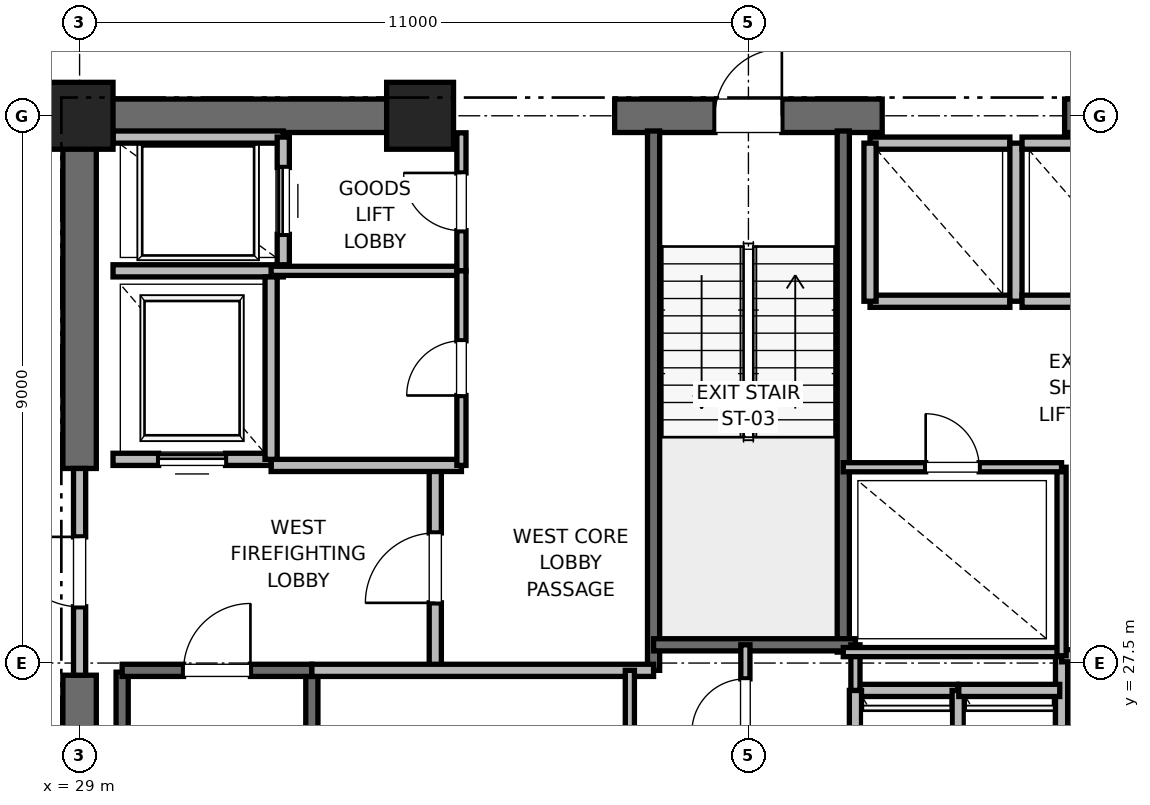
"""IFC4 building model, lengths in metres.
Left out: names, types, materials, properties, quantities, classifications, styles, units other than length and angle.
Written with IfcOpenShell. Run it as: python <this file> out.ifc"""

import sys

from ifc_helpers import new_model, si_unit, direction, frame, frame_2d, origin, origin_2d, place, context, subcontext, project, spatial, rectangle, extrude, element, fill, save


model = new_model("IFC4")
c1 = context("Model", 3, precision=1e-05, world=origin(), true_north=direction((0.0, 1.0)))
c2 = subcontext(c1, "Body", "Model", "MODEL_VIEW")
j1 = project(units=[si_unit("LENGTHUNIT", "METRE"), si_unit("PLANEANGLEUNIT", "RADIAN")], contexts=[c1])
p1 = place(None, origin())
s1 = spatial("IfcSite", under=j1, at=p1, CompositionType="ELEMENT")
p2 = place(p1, origin())
s2 = spatial("IfcBuilding", under=s1, at=p2, CompositionType="ELEMENT")
p3 = place(p2, frame((0.0, 0.0, 128.4)))
s3 = spatial("IfcBuildingStorey", under=s2, at=p3, CompositionType="ELEMENT", Elevation=128.4)
for number, where, z_axis, x_axis in (
    (1, (29.0, 36.5, 0.0), (0.0, 0.0, 1.0), (1.0, 0.0, 0.0)),
    (2, (34.6, 36.5, 0.0), (0.0, 0.0, 1.0), (1.0, 0.0, 0.0)),
):
    element("IfcColumn", number, at=place(p3, frame(where, z_axis=z_axis, x_axis=x_axis)), inside=s3, PredefinedType="PILASTER", context=c2, shape_type="SweptSolid", body=[
        extrude(rectangle(XDim=1.1, YDim=1.1, at=origin_2d()), origin(), (0.0, 0.0, 1.0), 4.0),
    ])
p4 = place(p3, frame((29.0, 36.5, 0.0), z_axis=(0.0, 0.0, 1.0), x_axis=(1.0, 0.0, 0.0)))
e3 = element("IfcWall", 3, at=p4, inside=s3, PredefinedType="SHEAR", context=c2, shape_type="SweptSolid", body=[
    extrude(rectangle(XDim=5.8, YDim=0.55, at=frame_2d((2.9, 0.0))), origin(), (0.0, 0.0, 1.0), 3.775),
])
p5 = place(p3, frame((37.8, 36.5, 0.0), z_axis=(0.0, 0.0, 1.0), x_axis=(1.0, 0.0, 0.0)))
e4 = element("IfcWall", 4, at=p5, inside=s3, PredefinedType="SHEAR", context=c2, shape_type="SweptSolid", body=[
    extrude(rectangle(XDim=4.4, YDim=0.55, at=frame_2d((2.2, 0.0))), origin(), (0.0, 0.0, 1.0), 3.775),
])
p6 = place(p5, frame((1.65, 0.0, 0.0)))
e5 = element("IfcOpeningElement", 5, at=p6, cuts=e4, PredefinedType="OPENING", context=c2, shape_type="SweptSolid", body=[
    extrude(rectangle(XDim=1.1, YDim=2.15, at=frame_2d((0.55, 1.075))), frame((0.0, 0.275, 0.0), z_axis=(0.0, -1.0, 0.0), x_axis=(1.0, 0.0, 0.0)), (0.0, 0.0, 1.0), 0.55),
])
p7 = place(p3, frame((45.2, 36.5, 0.0), z_axis=(0.0, 0.0, 1.0), x_axis=(1.0, 0.0, 0.0)))
e6 = element("IfcWall", 6, at=p7, inside=s3, PredefinedType="SHEAR", context=c2, shape_type="SweptSolid", body=[
    extrude(rectangle(XDim=5.8, YDim=0.55, at=frame_2d((2.9, 0.0))), origin(), (0.0, 0.0, 1.0), 3.775),
])
p8 = place(p3, frame((29.0, 18.5, 0.0), z_axis=(0.0, 0.0, 1.0), x_axis=(0.0, 1.0, 0.0)))
e7 = element("IfcWall", 7, at=p8, inside=s3, PredefinedType="SHEAR", context=c2, shape_type="SweptSolid", body=[
    extrude(rectangle(XDim=8.8, YDim=0.55, at=frame_2d((4.4, 0.0))), origin(), (0.0, 0.0, 1.0), 3.775),
])
p9 = place(p3, frame((29.0, 30.7, 0.0), z_axis=(0.0, 0.0, 1.0), x_axis=(0.0, 1.0, 0.0)))
e8 = element("IfcWall", 8, at=p9, inside=s3, PredefinedType="SHEAR", context=c2, shape_type="SweptSolid", body=[
    extrude(rectangle(XDim=5.8, YDim=0.55, at=frame_2d((2.9, 0.0))), origin(), (0.0, 0.0, 1.0), 3.775),
])
p10 = place(p3, frame((29.7, 19.2, 0.0), z_axis=(0.0, 0.0, 1.0), x_axis=(0.0, 1.0, 0.0)))
e9 = element("IfcWall", 9, at=p10, inside=s3, PredefinedType="SOLIDWALL", context=c2, shape_type="SweptSolid", body=[
    extrude(rectangle(XDim=8.15, YDim=0.2, at=frame_2d((4.075, 0.0))), origin(), (0.0, 0.0, 1.0), 3.775),
])
p11 = place(p3, frame((32.82, 18.6, 0.0), z_axis=(0.0, 0.0, 1.0), x_axis=(0.0, 1.0, 0.0)))
e10 = element("IfcWall", 10, at=p11, inside=s3, PredefinedType="SOLIDWALL", context=c2, shape_type="SweptSolid", body=[
    extrude(rectangle(XDim=8.78, YDim=0.2, at=frame_2d((4.39, 0.0))), origin(), (0.0, 0.0, 1.0), 3.775),
])
p12 = place(p3, frame((29.7, 27.38, 0.0), z_axis=(0.0, 0.0, 1.0), x_axis=(1.0, 0.0, 0.0)))
e11 = element("IfcWall", 11, at=p12, inside=s3, PredefinedType="SOLIDWALL", context=c2, shape_type="SweptSolid", body=[
    extrude(rectangle(XDim=3.12, YDim=0.2, at=frame_2d((1.56, 0.0))), origin(), (0.0, 0.0, 1.0), 3.775),
])
p13 = place(p12, frame((1.01, 0.0, 0.0)))
e12 = element("IfcOpeningElement", 12, at=p13, cuts=e11, PredefinedType="OPENING", context=c2, shape_type="SweptSolid", body=[
    extrude(rectangle(XDim=1.1, YDim=2.15, at=frame_2d((0.55, 1.075))), frame((0.0, 0.1, 0.0), z_axis=(0.0, -1.0, 0.0), x_axis=(1.0, 0.0, 0.0)), (0.0, 0.0, 1.0), 0.2),
])
p14 = place(p3, frame((38.44, 27.38, 0.0), z_axis=(0.0, 0.0, 1.0), x_axis=(0.0, 1.0, 0.0)))
e13 = element("IfcWall", 13, at=p14, inside=s3, PredefinedType="SOLIDWALL", context=c2, shape_type="SweptSolid", body=[
    extrude(rectangle(XDim=8.87, YDim=0.2, at=frame_2d((4.435, 0.0))), origin(), (0.0, 0.0, 1.0), 3.775),
])
p15 = place(p3, frame((41.56, 27.68, 0.0), z_axis=(0.0, 0.0, 1.0), x_axis=(0.0, 1.0, 0.0)))
e14 = element("IfcWall", 14, at=p15, inside=s3, PredefinedType="SOLIDWALL", context=c2, shape_type="SweptSolid", body=[
    extrude(rectangle(XDim=8.57, YDim=0.2, at=frame_2d((4.285, 0.0))), origin(), (0.0, 0.0, 1.0), 3.775),
])
p16 = place(p3, frame((38.44, 27.8, 0.0), z_axis=(0.0, 0.0, 1.0), x_axis=(1.0, 0.0, 0.0)))
e15 = element("IfcWall", 15, at=p16, inside=s3, PredefinedType="SOLIDWALL", context=c2, shape_type="SweptSolid", body=[
    extrude(rectangle(XDim=3.32, YDim=0.2, at=frame_2d((1.66, 0.0))), origin(), (0.0, 0.0, 1.0), 3.775),
])
p17 = place(p3, frame((34.85, 27.38, 0.0), z_axis=(0.0, 0.0, 1.0), x_axis=(0.0, 1.0, 0.0)))
e16 = element("IfcWall", 16, at=p17, inside=s3, PredefinedType="PARTITIONING", context=c2, shape_type="SweptSolid", body=[
    extrude(rectangle(XDim=3.37, YDim=0.2, at=frame_2d((1.685, 0.0))), origin(), (0.0, 0.0, 1.0), 3.775),
])
p18 = place(p17, frame((1.11, 0.0, 0.0)))
e17 = element("IfcOpeningElement", 17, at=p18, cuts=e16, PredefinedType="OPENING", context=c2, shape_type="SweptSolid", body=[
    extrude(rectangle(XDim=1.15, YDim=2.2, at=frame_2d((0.575, 1.1))), frame((0.0, 0.1, 0.0), z_axis=(0.0, -1.0, 0.0), x_axis=(1.0, 0.0, 0.0)), (0.0, 0.0, 1.0), 0.2),
])
p19 = place(p3, frame((29.0, 27.3, 0.0), z_axis=(0.0, 0.0, 1.0), x_axis=(0.0, 1.0, 0.0)))
e18 = element("IfcWall", 18, at=p19, inside=s3, PredefinedType="PARTITIONING", context=c2, shape_type="SweptSolid", body=[
    extrude(rectangle(XDim=3.4, YDim=0.2, at=frame_2d((1.7, 0.0))), origin(), (0.0, 0.0, 1.0), 2.755),
])
p20 = place(p19, frame((1.125, 0.0, 0.0)))
e19 = element("IfcOpeningElement", 19, at=p20, cuts=e18, PredefinedType="OPENING", context=c2, shape_type="SweptSolid", body=[
    extrude(rectangle(XDim=1.15, YDim=2.2, at=frame_2d((0.575, 1.1))), frame((0.0, 0.1, 0.0), z_axis=(0.0, -1.0, 0.0), x_axis=(1.0, 0.0, 0.0)), (0.0, 0.0, 1.0), 0.2),
])
p21 = place(p3, frame((32.82, 27.38, 0.0), z_axis=(0.0, 0.0, 1.0), x_axis=(1.0, 0.0, 0.0)))
e20 = element("IfcWall", 20, at=p21, inside=s3, PredefinedType="PARTITIONING", context=c2, shape_type="SweptSolid", body=[
    extrude(rectangle(XDim=5.62, YDim=0.2, at=frame_2d((2.81, 0.0))), origin(), (0.0, 0.0, 1.0), 3.775),
])
p22 = place(p3, frame((32.15, 30.75, 0.0), z_axis=(0.0, 0.0, 1.0), x_axis=(1.0, 0.0, 0.0)))
e21 = element("IfcWall", 21, at=p22, inside=s3, PredefinedType="PARTITIONING", context=c2, shape_type="SweptSolid", body=[
    extrude(rectangle(XDim=3.13, YDim=0.2, at=frame_2d((1.565, 0.0))), origin(), (0.0, 0.0, 1.0), 3.775),
])
p23 = place(p3, frame((45.15, 24.25, 0.0), z_axis=(0.0, 0.0, 1.0), x_axis=(0.0, 1.0, 0.0)))
e22 = element("IfcWall", 22, at=p23, inside=s3, PredefinedType="PARTITIONING", context=c2, shape_type="SweptSolid", body=[
    extrude(rectangle(XDim=3.37, YDim=0.2, at=frame_2d((1.685, 0.0))), origin(), (0.0, 0.0, 1.0), 3.775),
])
p24 = place(p3, frame((45.15, 27.62, 0.0), z_axis=(0.0, 0.0, 1.0), x_axis=(1.0, 0.0, 0.0)))
e23 = element("IfcWall", 23, at=p24, inside=s3, PredefinedType="PARTITIONING", context=c2, shape_type="SweptSolid", body=[
    extrude(rectangle(XDim=2.03, YDim=0.2, at=frame_2d((1.015, 0.0))), origin(), (0.0, 0.0, 1.0), 3.775),
])
p25 = place(p24, frame((0.44, 0.0, 0.0)))
e24 = element("IfcOpeningElement", 24, at=p25, cuts=e23, PredefinedType="OPENING", context=c2, shape_type="SweptSolid", body=[
    extrude(rectangle(XDim=1.15, YDim=2.2, at=frame_2d((0.575, 1.1))), frame((0.0, 0.1, 0.0), z_axis=(0.0, -1.0, 0.0), x_axis=(1.0, 0.0, 0.0)), (0.0, 0.0, 1.0), 0.2),
])
p26 = place(p3, frame((29.55, 30.85, 0.0), z_axis=(0.0, 0.0, 1.0), x_axis=(1.0, 0.0, 0.0)))
e25 = element("IfcWall", 25, at=p26, inside=s3, PredefinedType="SOLIDWALL", context=c2, shape_type="SweptSolid", body=[
    extrude(rectangle(XDim=2.6, YDim=0.2, at=frame_2d((1.3, 0.0))), origin(), (0.0, 0.0, 1.0), 2.755),
])
p27 = place(p26, frame((0.75, 0.0, 0.0)))
e26 = element("IfcOpeningElement", 26, at=p27, cuts=e25, PredefinedType="OPENING", context=c2, shape_type="SweptSolid", body=[
    extrude(rectangle(XDim=1.1, YDim=2.2, at=frame_2d((0.55, 1.1))), frame((0.0, 0.1, 0.0), z_axis=(0.0, -1.0, 0.0), x_axis=(1.0, 0.0, 0.0)), (0.0, 0.0, 1.0), 0.2),
])
p28 = place(p3, frame((29.55, 33.95, 0.0), z_axis=(0.0, 0.0, 1.0), x_axis=(1.0, 0.0, 0.0)))
e27 = element("IfcWall", 27, at=p28, inside=s3, PredefinedType="SOLIDWALL", context=c2, shape_type="SweptSolid", body=[
    extrude(rectangle(XDim=2.8, YDim=0.2, at=frame_2d((1.4, 0.0))), origin(), (0.0, 0.0, 1.0), 3.775),
])
p29 = place(p3, frame((32.15, 30.85, 0.0), z_axis=(0.0, 0.0, 1.0), x_axis=(0.0, 1.0, 0.0)))
e28 = element("IfcWall", 28, at=p29, inside=s3, PredefinedType="SOLIDWALL", context=c2, shape_type="SweptSolid", body=[
    extrude(rectangle(XDim=3.0, YDim=0.2, at=frame_2d((1.5, 0.0))), origin(), (0.0, 0.0, 1.0), 3.775),
])
p30 = place(p3, frame((32.35, 36.15, 0.0), z_axis=(0.0, 0.0, 1.0), x_axis=(-1.0, 0.0, 0.0)))
e29 = element("IfcWall", 29, at=p30, inside=s3, PredefinedType="SOLIDWALL", context=c2, shape_type="SweptSolid", body=[
    extrude(rectangle(XDim=2.8, YDim=0.2, at=frame_2d((1.4, 0.0))), origin(), (0.0, 0.0, 1.0), 2.985),
])
p31 = place(p3, frame((32.35, 34.05, 0.0), z_axis=(0.0, 0.0, 1.0), x_axis=(0.0, 1.0, 0.0)))
e30 = element("IfcWall", 30, at=p31, inside=s3, PredefinedType="SOLIDWALL", context=c2, shape_type="SweptSolid", body=[
    extrude(rectangle(XDim=2.1, YDim=0.2, at=frame_2d((1.05, 0.0))), origin(), (0.0, 0.0, 1.0), 3.775),
])
p32 = place(p31, frame((0.5, 0.0, 0.0)))
e31 = element("IfcOpeningElement", 31, at=p32, cuts=e30, PredefinedType="OPENING", context=c2, shape_type="SweptSolid", body=[
    extrude(rectangle(XDim=1.1, YDim=2.2, at=frame_2d((0.55, 1.1))), frame((0.0, 0.1, 0.0), z_axis=(0.0, -1.0, 0.0), x_axis=(1.0, 0.0, 0.0)), (0.0, 0.0, 1.0), 0.2),
])
p33 = place(p3, frame((43.44, 27.05, 0.0), z_axis=(0.0, 0.0, 1.0), x_axis=(-1.0, 0.0, 0.0)))
e32 = element("IfcWall", 32, at=p33, inside=s3, PredefinedType="SOLIDWALL", context=c2, shape_type="SweptSolid", body=[
    extrude(rectangle(XDim=1.68, YDim=0.2, at=frame_2d((0.84, 0.0))), origin(), (0.0, 0.0, 1.0), 3.775),
])
for number, where, z_axis, x_axis in (
    (33, (41.76, 27.05, 0.0), (0.0, 0.0, 1.0), (0.0, -1.0, 0.0)),
    (34, (43.45, 24.45, 0.0), (0.0, 0.0, 1.0), (0.0, 1.0, 0.0)),
):
    element("IfcWall", number, at=place(p3, frame(where, z_axis=z_axis, x_axis=x_axis)), inside=s3, PredefinedType="SOLIDWALL", context=c2, shape_type="SweptSolid", body=[
        extrude(rectangle(XDim=2.6, YDim=0.2, at=frame_2d((1.3, 0.0))), origin(), (0.0, 0.0, 1.0), 3.775),
    ])
p34 = place(p3, frame((45.12, 27.05, 0.0), z_axis=(0.0, 0.0, 1.0), x_axis=(-1.0, 0.0, 0.0)))
e35 = element("IfcWall", 35, at=p34, inside=s3, PredefinedType="SOLIDWALL", context=c2, shape_type="SweptSolid", body=[
    extrude(rectangle(XDim=1.66, YDim=0.2, at=frame_2d((0.83, 0.0))), origin(), (0.0, 0.0, 1.0), 3.775),
])
p35 = place(p3, frame((42.0, 33.45, 0.0), z_axis=(0.0, 0.0, 1.0), x_axis=(1.0, 0.0, 0.0)))
e36 = element("IfcWall", 36, at=p35, inside=s3, PredefinedType="SOLIDWALL", context=c2, shape_type="SweptSolid", body=[
    extrude(rectangle(XDim=2.3, YDim=0.2, at=frame_2d((1.15, 0.0))), origin(), (0.0, 0.0, 1.0), 3.775),
])
p36 = place(p3, frame((44.3, 36.05, 0.0), z_axis=(0.0, 0.0, 1.0), x_axis=(-1.0, 0.0, 0.0)))
e37 = element("IfcWall", 37, at=p36, inside=s3, PredefinedType="SOLIDWALL", context=c2, shape_type="SweptSolid", body=[
    extrude(rectangle(XDim=2.3, YDim=0.2, at=frame_2d((1.15, 0.0))), origin(), (0.0, 0.0, 1.0), 2.755),
])
for number, where, z_axis, x_axis in (
    (38, (42.0, 36.05, 0.0), (0.0, 0.0, 1.0), (0.0, -1.0, 0.0)),
    (39, (44.4, 33.45, 0.0), (0.0, 0.0, 1.0), (0.0, 1.0, 0.0)),
):
    element("IfcWall", number, at=place(p3, frame(where, z_axis=z_axis, x_axis=x_axis)), inside=s3, PredefinedType="SOLIDWALL", context=c2, shape_type="SweptSolid", body=[
        extrude(rectangle(XDim=2.6, YDim=0.2, at=frame_2d((1.3, 0.0))), origin(), (0.0, 0.0, 1.0), 2.755),
    ])
p37 = place(p3, frame((44.5, 33.45, 0.0), z_axis=(0.0, 0.0, 1.0), x_axis=(1.0, 0.0, 0.0)))
e40 = element("IfcWall", 40, at=p37, inside=s3, PredefinedType="SOLIDWALL", context=c2, shape_type="SweptSolid", body=[
    extrude(rectangle(XDim=2.3, YDim=0.2, at=frame_2d((1.15, 0.0))), origin(), (0.0, 0.0, 1.0), 3.775),
])
p38 = place(p3, frame((46.8, 36.05, 0.0), z_axis=(0.0, 0.0, 1.0), x_axis=(-1.0, 0.0, 0.0)))
e41 = element("IfcWall", 41, at=p38, inside=s3, PredefinedType="SOLIDWALL", context=c2, shape_type="SweptSolid", body=[
    extrude(rectangle(XDim=2.3, YDim=0.2, at=frame_2d((1.15, 0.0))), origin(), (0.0, 0.0, 1.0), 2.755),
])
p39 = place(p3, frame((41.76, 27.05, 0.0), z_axis=(0.0, 0.0, 1.0), x_axis=(0.0, 1.0, 0.0)))
e42 = element("IfcWall", 42, at=p39, inside=s3, PredefinedType="PARTITIONING", context=c2, shape_type="SweptSolid", body=[
    extrude(rectangle(XDim=0.75, YDim=0.15, at=frame_2d((0.375, 0.0))), origin(), (0.0, 0.0, 1.0), 2.85),
])
p40 = place(p3, frame((39.95, 25.8, 0.0), z_axis=(0.0, 0.0, 1.0), x_axis=(0.0, 1.0, 0.0)))
e43 = element("IfcWall", 43, at=p40, inside=s3, PredefinedType="PARTITIONING", context=c2, shape_type="SweptSolid", body=[
    extrude(rectangle(XDim=2.0, YDim=0.15, at=frame_2d((1.0, 0.0))), origin(), (0.0, 0.0, 1.0), 2.85),
])
p41 = place(p40, frame((0.56, 0.0, 0.0)))
e44 = element("IfcOpeningElement", 44, at=p41, cuts=e43, PredefinedType="OPENING", context=c2, shape_type="SweptSolid", body=[
    extrude(rectangle(XDim=0.88, YDim=2.1, at=frame_2d((0.44, 1.05))), frame((0.0, 0.075, 0.0), z_axis=(0.0, -1.0, 0.0), x_axis=(1.0, 0.0, 0.0)), (0.0, 0.0, 1.0), 0.15),
])
p42 = place(p3, frame((32.15, 33.95, 0.0), z_axis=(0.0, 0.0, 1.0), x_axis=(1.0, 0.0, 0.0)))
e45 = element("IfcWall", 45, at=p42, inside=s3, PredefinedType="PARTITIONING", context=c2, shape_type="SweptSolid", body=[
    extrude(rectangle(XDim=3.13, YDim=0.15, at=frame_2d((1.565, 0.0))), origin(), (0.0, 0.0, 1.0), 2.85),
])
p43 = place(p3, frame((35.28, 33.95, 0.0), z_axis=(0.0, 0.0, 1.0), x_axis=(0.0, 1.0, 0.0)))
e46 = element("IfcWall", 46, at=p43, inside=s3, PredefinedType="PARTITIONING", context=c2, shape_type="SweptSolid", body=[
    extrude(rectangle(XDim=2.27, YDim=0.15, at=frame_2d((1.135, 0.0))), origin(), (0.0, 0.0, 1.0), 2.755),
])
p44 = place(p43, frame((0.66, 0.0, 0.0)))
e47 = element("IfcOpeningElement", 47, at=p44, cuts=e46, PredefinedType="OPENING", context=c2, shape_type="SweptSolid", body=[
    extrude(rectangle(XDim=0.95, YDim=2.15, at=frame_2d((0.475, 1.075))), frame((0.0, 0.075, 0.0), z_axis=(0.0, -1.0, 0.0), x_axis=(1.0, 0.0, 0.0)), (0.0, 0.0, 1.0), 0.15),
])
p45 = place(p3, frame((35.28, 30.75, 0.0), z_axis=(0.0, 0.0, 1.0), x_axis=(0.0, 1.0, 0.0)))
e48 = element("IfcWall", 48, at=p45, inside=s3, PredefinedType="PARTITIONING", context=c2, shape_type="SweptSolid", body=[
    extrude(rectangle(XDim=3.2, YDim=0.15, at=frame_2d((1.6, 0.0))), origin(), (0.0, 0.0, 1.0), 2.85),
])
p46 = place(p45, frame((1.15, 0.0, 0.0)))
e49 = element("IfcOpeningElement", 49, at=p46, cuts=e48, PredefinedType="OPENING", context=c2, shape_type="SweptSolid", body=[
    extrude(rectangle(XDim=0.9, YDim=2.1, at=frame_2d((0.45, 1.05))), frame((0.0, 0.075, 0.0), z_axis=(0.0, -1.0, 0.0), x_axis=(1.0, 0.0, 0.0)), (0.0, 0.0, 1.0), 0.15),
])
p47 = place(p3, frame((38.05, 18.6, 0.0), z_axis=(0.0, 0.0, 1.0), x_axis=(0.0, 1.0, 0.0)))
e50 = element("IfcWall", 50, at=p47, inside=s3, PredefinedType="PARTITIONING", context=c2, shape_type="SweptSolid", body=[
    extrude(rectangle(XDim=8.78, YDim=0.15, at=frame_2d((4.39, 0.0))), origin(), (0.0, 0.0, 1.0), 2.755),
])
p48 = place(p47, frame((3.89, 0.0, 0.0)))
e51 = element("IfcOpeningElement", 51, at=p48, cuts=e50, PredefinedType="OPENING", context=c2, shape_type="SweptSolid", body=[
    extrude(rectangle(XDim=1.0, YDim=2.15, at=frame_2d((0.5, 1.075))), frame((0.0, 0.075, 0.0), z_axis=(0.0, -1.0, 0.0), x_axis=(1.0, 0.0, 0.0)), (0.0, 0.0, 1.0), 0.15),
])
p49 = place(p3, frame((41.56, 27.68, 0.0), z_axis=(0.0, 0.0, 1.0), x_axis=(1.0, 0.0, 0.0)))
e52 = element("IfcWall", 52, at=p49, inside=s3, PredefinedType="PARTITIONING", context=c2, shape_type="SweptSolid", body=[
    extrude(rectangle(XDim=3.59, YDim=0.15, at=frame_2d((1.795, 0.0))), origin(), (0.0, 0.0, 1.0), 2.85),
])
p50 = place(p3, frame((45.15, 27.62, 0.0), z_axis=(0.0, 0.0, 1.0), x_axis=(0.0, 1.0, 0.0)))
e53 = element("IfcWall", 53, at=p50, inside=s3, PredefinedType="PARTITIONING", context=c2, shape_type="SweptSolid", body=[
    extrude(rectangle(XDim=3.1, YDim=0.15, at=frame_2d((1.55, 0.0))), origin(), (0.0, 0.0, 1.0), 2.85),
])
p51 = place(p3, frame((41.56, 30.72, 0.0), z_axis=(0.0, 0.0, 1.0), x_axis=(1.0, 0.0, 0.0)))
e54 = element("IfcWall", 54, at=p51, inside=s3, PredefinedType="PARTITIONING", context=c2, shape_type="SweptSolid", body=[
    extrude(rectangle(XDim=3.59, YDim=0.15, at=frame_2d((1.795, 0.0))), origin(), (0.0, 0.0, 1.0), 2.85),
])
p52 = place(p51, frame((1.355, 0.0, 0.0)))
e55 = element("IfcOpeningElement", 55, at=p52, cuts=e54, PredefinedType="OPENING", context=c2, shape_type="SweptSolid", body=[
    extrude(rectangle(XDim=0.88, YDim=2.1, at=frame_2d((0.44, 1.05))), frame((0.0, 0.075, 0.0), z_axis=(0.0, -1.0, 0.0), x_axis=(1.0, 0.0, 0.0)), (0.0, 0.0, 1.0), 0.15),
])
p53 = place(p13, origin())
e56 = element("IfcDoor", 56, at=p53, inside=s3, OperationType="SINGLE_SWING_RIGHT", PredefinedType="DOOR", context=c2, shape_type="SweptSolid", body=[
    extrude(rectangle(XDim=1.1, YDim=2.15, at=frame_2d((0.55, 1.075))), frame((0.0, 0.025, 0.0), z_axis=(0.0, -1.0, 0.0), x_axis=(1.0, 0.0, 0.0)), (0.0, 0.0, 1.0), 0.05),
])
fill(e12, e56)
p54 = place(p6, origin())
e57 = element("IfcDoor", 57, at=p54, inside=s3, OperationType="SINGLE_SWING_RIGHT", PredefinedType="DOOR", context=c2, shape_type="SweptSolid", body=[
    extrude(rectangle(XDim=1.1, YDim=2.15, at=frame_2d((0.55, 1.075))), frame((0.0, 0.025, 0.0), z_axis=(0.0, -1.0, 0.0), x_axis=(1.0, 0.0, 0.0)), (0.0, 0.0, 1.0), 0.05),
])
fill(e5, e57)
p55 = place(p18, origin())
e58 = element("IfcDoor", 58, at=p55, inside=s3, OperationType="SINGLE_SWING_LEFT", PredefinedType="DOOR", context=c2, shape_type="SweptSolid", body=[
    extrude(rectangle(XDim=1.15, YDim=2.2, at=frame_2d((0.575, 1.1))), frame((0.0, 0.025, 0.0), z_axis=(0.0, -1.0, 0.0), x_axis=(1.0, 0.0, 0.0)), (0.0, 0.0, 1.0), 0.05),
])
fill(e17, e58)
p56 = place(p20, origin())
e59 = element("IfcDoor", 59, at=p56, inside=s3, OperationType="SINGLE_SWING_RIGHT", PredefinedType="DOOR", context=c2, shape_type="SweptSolid", body=[
    extrude(rectangle(XDim=1.15, YDim=2.2, at=frame_2d((0.575, 1.1))), frame((0.0, 0.025, 0.0), z_axis=(0.0, -1.0, 0.0), x_axis=(1.0, 0.0, 0.0)), (0.0, 0.0, 1.0), 0.05),
])
fill(e19, e59)
p57 = place(p27, origin())
e60 = element("IfcDoor", 60, at=p57, inside=s3, OperationType="SLIDING_TO_RIGHT", PredefinedType="DOOR", context=c2, shape_type="SweptSolid", body=[
    extrude(rectangle(XDim=1.1, YDim=2.2, at=frame_2d((0.55, 1.1))), frame((0.0, 0.025, 0.0), z_axis=(0.0, -1.0, 0.0), x_axis=(1.0, 0.0, 0.0)), (0.0, 0.0, 1.0), 0.05),
])
fill(e26, e60)
p58 = place(p32, origin())
e61 = element("IfcDoor", 61, at=p58, inside=s3, OperationType="SLIDING_TO_RIGHT", PredefinedType="DOOR", context=c2, shape_type="SweptSolid", body=[
    extrude(rectangle(XDim=1.1, YDim=2.2, at=frame_2d((0.55, 1.1))), frame((0.0, 0.025, 0.0), z_axis=(0.0, -1.0, 0.0), x_axis=(1.0, 0.0, 0.0)), (0.0, 0.0, 1.0), 0.05),
])
fill(e31, e61)
p59 = place(p41, origin())
e62 = element("IfcDoor", 62, at=p59, inside=s3, OperationType="SINGLE_SWING_LEFT", PredefinedType="DOOR", context=c2, shape_type="SweptSolid", body=[
    extrude(rectangle(XDim=0.88, YDim=2.1, at=frame_2d((0.44, 1.05))), frame((0.0, 0.025, 0.0), z_axis=(0.0, -1.0, 0.0), x_axis=(1.0, 0.0, 0.0)), (0.0, 0.0, 1.0), 0.05),
])
fill(e44, e62)
p60 = place(p44, origin())
e63 = element("IfcDoor", 63, at=p60, inside=s3, OperationType="SINGLE_SWING_RIGHT", PredefinedType="DOOR", context=c2, shape_type="SweptSolid", body=[
    extrude(rectangle(XDim=0.95, YDim=2.15, at=frame_2d((0.475, 1.075))), frame((0.0, 0.025, 0.0), z_axis=(0.0, -1.0, 0.0), x_axis=(1.0, 0.0, 0.0)), (0.0, 0.0, 1.0), 0.05),
])
fill(e47, e63)
p61 = place(p46, origin())
e64 = element("IfcDoor", 64, at=p61, inside=s3, OperationType="SINGLE_SWING_LEFT", PredefinedType="DOOR", context=c2, shape_type="SweptSolid", body=[
    extrude(rectangle(XDim=0.9, YDim=2.1, at=frame_2d((0.45, 1.05))), frame((0.0, 0.025, 0.0), z_axis=(0.0, -1.0, 0.0), x_axis=(1.0, 0.0, 0.0)), (0.0, 0.0, 1.0), 0.05),
])
fill(e49, e64)
p62 = place(p52, origin())
e65 = element("IfcDoor", 65, at=p62, inside=s3, OperationType="SINGLE_SWING_LEFT", PredefinedType="DOOR", context=c2, shape_type="SweptSolid", body=[
    extrude(rectangle(XDim=0.88, YDim=2.1, at=frame_2d((0.44, 1.05))), frame((0.0, 0.025, 0.0), z_axis=(0.0, -1.0, 0.0), x_axis=(1.0, 0.0, 0.0)), (0.0, 0.0, 1.0), 0.05),
])
fill(e55, e65)
save(model, sys.argv[1])
